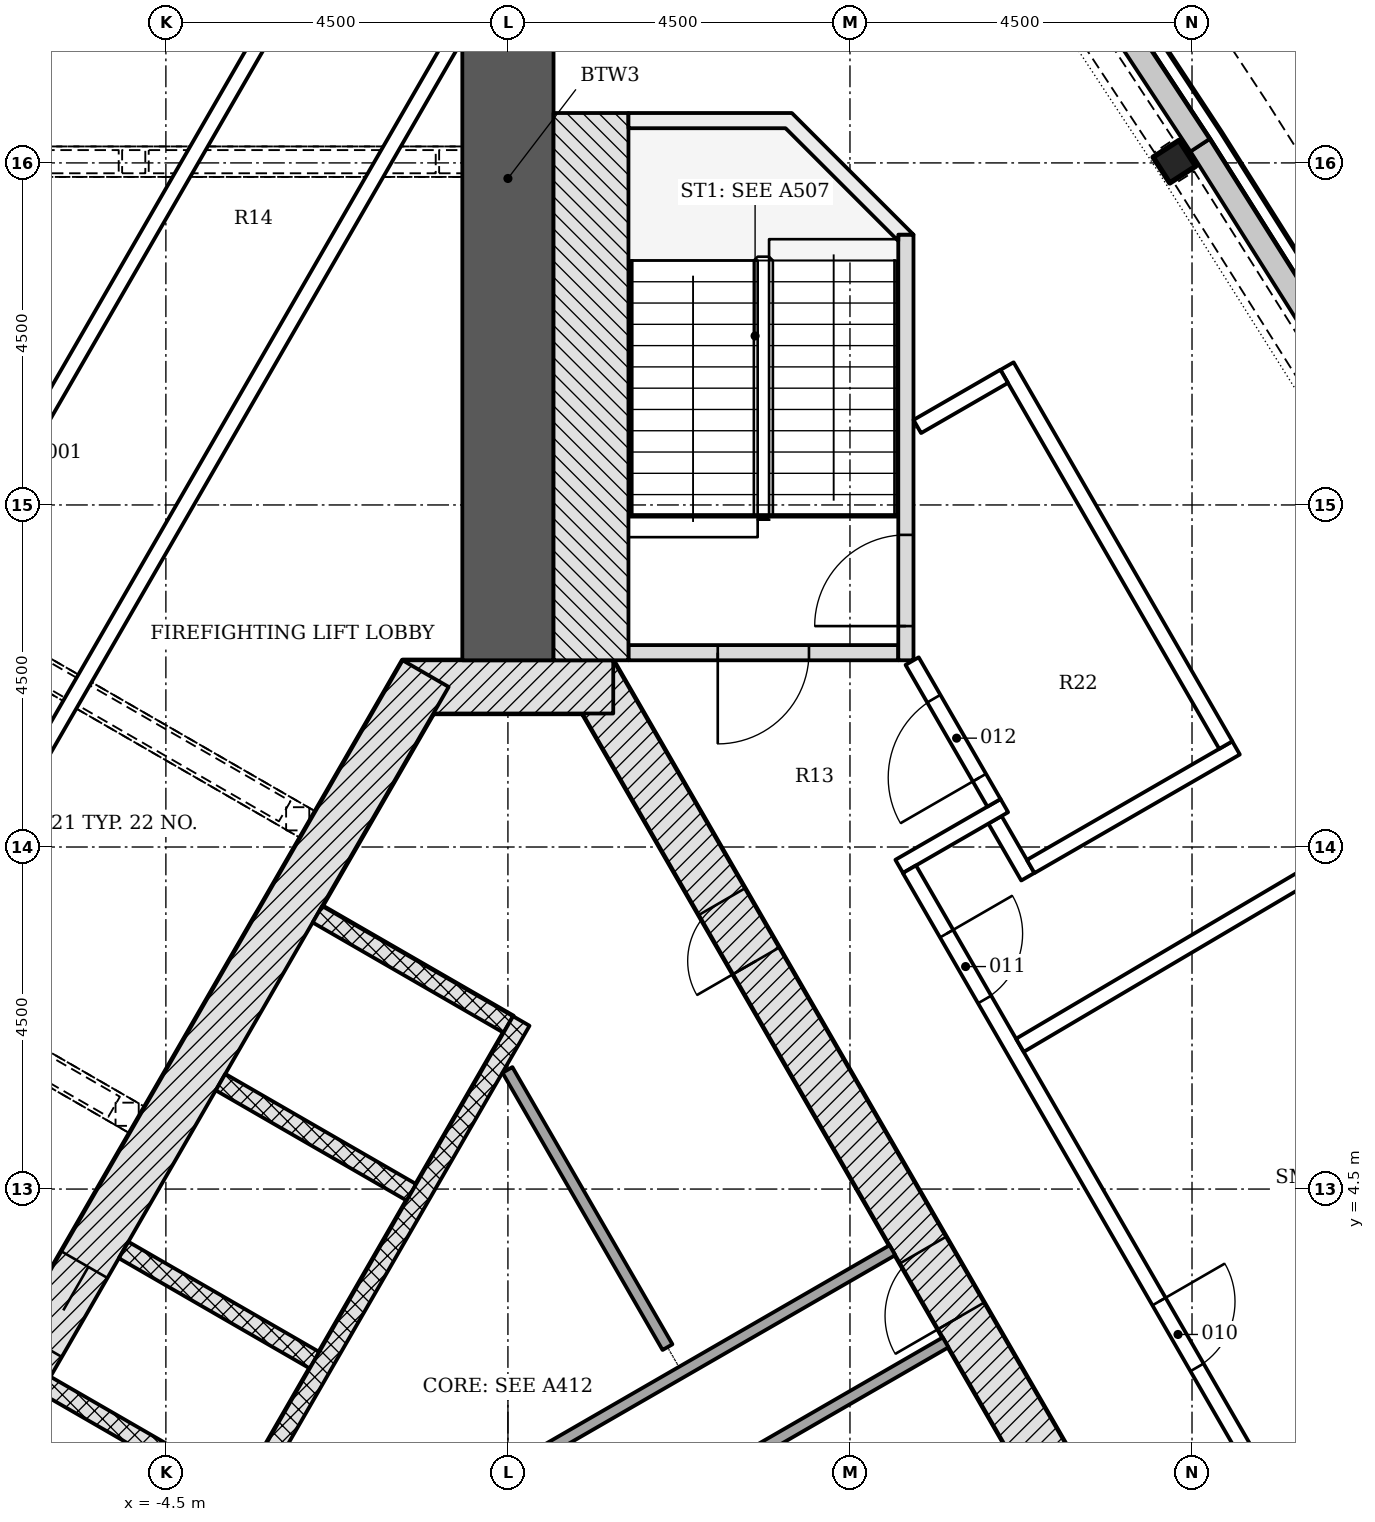
"""IFC4 building model, lengths in metres.
Left out: names, types, materials, properties, quantities, classifications, styles, units other than length and angle.
Written with IfcOpenShell. Run it as: python <this file> out.ifc"""

import sys

from ifc_helpers import new_model, si_unit, direction, frame, frame_2d, origin, origin_2d, place, context, subcontext, project, spatial, polyline, rectangle, i_section, outline, extrude, element, fill, save


model = new_model("IFC4")
c1 = context("Model", 3, precision=1e-05, world=origin(), true_north=direction((0.0, 1.0)))
c2 = subcontext(c1, "Body", "Model", "MODEL_VIEW")
j1 = project(units=[si_unit("LENGTHUNIT", "METRE"), si_unit("PLANEANGLEUNIT", "RADIAN")], contexts=[c1])
p1 = place(None, origin())
s1 = spatial("IfcSite", under=j1, at=p1, CompositionType="ELEMENT")
p2 = place(p1, origin())
s2 = spatial("IfcBuilding", under=s1, at=p2, CompositionType="ELEMENT")
p3 = place(p2, frame((0.0, 0.0, 87.0)))
s3 = spatial("IfcBuildingStorey", under=s2, at=p3, CompositionType="ELEMENT", Elevation=87.0)
p4 = place(p3, frame((10.311, -4.703, -0.3), z_axis=(0.0, 0.0, 1.0), x_axis=(-0.500001446645, 0.866024568562, 0.0)))
e1 = element("IfcWall", 1, at=p4, inside=s3, PredefinedType="SHEAR", context=c2, shape_type="SweptSolid", body=[
    extrude(rectangle(XDim=18.458, YDim=0.7, at=frame_2d((9.229, 0.0))), origin(), (0.0, 0.0, 1.0), 4.6),
])
p5 = place(p4, frame((8.7, 0.0, 0.3)))
e2 = element("IfcOpeningElement", 2, at=p5, cuts=e1, PredefinedType="OPENING", context=c2, shape_type="SweptSolid", body=[
    extrude(rectangle(XDim=1.0, YDim=2.1, at=frame_2d((0.5, 1.05))), frame((0.0, 0.36, 0.0), z_axis=(0.0, -1.0, 0.0), x_axis=(1.0, 0.0, 0.0)), (0.0, 0.0, 1.0), 0.72),
])
p6 = place(p4, frame((4.002, 0.0, 0.3)))
e3 = element("IfcOpeningElement", 3, at=p6, cuts=e1, PredefinedType="OPENING", context=c2, shape_type="SweptSolid", body=[
    extrude(rectangle(XDim=0.9, YDim=2.1, at=frame_2d((0.45, 1.05))), frame((0.0, 0.36, 0.0), z_axis=(0.0, -1.0, 0.0), x_axis=(1.0, 0.0, 0.0)), (0.0, 0.0, 1.0), 0.72),
])
p7 = place(p4, frame((14.093, 0.0, 0.3)))
e4 = element("IfcOpeningElement", 4, at=p7, cuts=e1, PredefinedType="OPENING", context=c2, shape_type="SweptSolid", body=[
    extrude(rectangle(XDim=0.9, YDim=2.1, at=frame_2d((0.45, 1.05))), frame((0.0, 0.36, 0.0), z_axis=(0.0, -1.0, 0.0), x_axis=(1.0, 0.0, 0.0)), (0.0, 0.0, 1.0), 0.72),
])
p8 = place(p3, frame((1.386, 11.106, -0.3), z_axis=(0.0, 0.0, 1.0), x_axis=(-1.0, 0.0, 0.0)))
e5 = element("IfcWall", 5, at=p8, inside=s3, PredefinedType="SHEAR", context=c2, shape_type="SweptSolid", body=[
    extrude(rectangle(XDim=2.771, YDim=0.7, at=frame_2d((1.386, 0.0))), origin(), (0.0, 0.0, 1.0), 4.6),
])
p9 = place(p3, frame((-1.083, 11.281, -0.3), z_axis=(0.0, 0.0, 1.0), x_axis=(-0.500001446645, -0.866024568562, 0.0)))
e6 = element("IfcWall", 6, at=p9, inside=s3, PredefinedType="SHEAR", context=c2, shape_type="SweptSolid", body=[
    extrude(rectangle(XDim=18.458, YDim=0.7, at=frame_2d((9.229, 0.0))), origin(), (0.0, 0.0, 1.0), 4.6),
])
p10 = place(p9, frame((8.979, 0.0, 0.3)))
e7 = element("IfcOpeningElement", 7, at=p10, cuts=e6, PredefinedType="OPENING", context=c2, shape_type="SweptSolid", body=[
    extrude(rectangle(XDim=1.2, YDim=2.1, at=frame_2d((0.6, 1.05))), frame((0.0, 0.36, 0.0), z_axis=(0.0, -1.0, 0.0), x_axis=(1.0, 0.0, 0.0)), (0.0, 0.0, 1.0), 0.72),
])
p11 = place(p9, frame((11.029, 0.0, 0.3)))
e8 = element("IfcOpeningElement", 8, at=p11, cuts=e6, PredefinedType="OPENING", context=c2, shape_type="SweptSolid", body=[
    extrude(rectangle(XDim=1.2, YDim=2.1, at=frame_2d((0.6, 1.05))), frame((0.0, 0.36, 0.0), z_axis=(0.0, -1.0, 0.0), x_axis=(1.0, 0.0, 0.0)), (0.0, 0.0, 1.0), 0.72),
])
p12 = place(p3, frame((0.0, 11.456, -0.3), z_axis=(0.0, 0.0, 1.0), x_axis=(0.0, 1.0, 0.0)))
e9 = element("IfcWall", 9, at=p12, inside=s3, PredefinedType="SHEAR", context=c2, shape_type="SweptSolid", body=[
    extrude(rectangle(XDim=12.678, YDim=1.2, at=frame_2d((6.339, 0.0))), origin(), (0.0, 0.0, 1.0), 4.6),
])
p13 = place(p3, frame((8.768, 18.016, -0.3), z_axis=(0.0, 0.0, 1.0), x_axis=(-0.541993100424, 0.840382935984, 0.0)))
e10 = element("IfcColumn", 10, at=p13, inside=s3, PredefinedType="COLUMN", context=c2, shape_type="SweptSolid", body=[
    extrude(i_section(OverallWidth=0.404, OverallDepth=0.406, WebThickness=0.027, FlangeThickness=0.044, FilletRadius=0.015, at=origin_2d()), origin(), (0.0, 0.0, 1.0), 4.6),
])
p14 = place(p3, origin())
e11 = element("IfcWall", 11, at=p14, inside=s3, PredefinedType="NOTDEFINED", context=c2, shape_type="SweptSolid", body=[
    extrude(outline(polyline([(11.632, 14.509), (9.23, 18.314), (8.977, 18.154), (11.378, 14.349), (11.632, 14.509)])), origin(), (0.0, 0.0, 1.0), 1.2),
])
p15 = place(p3, origin())
e12 = element("IfcWall", 12, at=p15, inside=s3, PredefinedType="NOTDEFINED", context=c2, shape_type="SweptSolid", body=[
    extrude(outline(polyline([(9.23, 18.314), (6.754, 22.072), (6.504, 21.907), (8.98, 18.149), (9.23, 18.314)])), origin(), (0.0, 0.0, 1.0), 1.2),
])
p16 = place(p3, frame((-2.506, 8.115, -0.3), z_axis=(0.0, 0.0, 1.0), x_axis=(0.865996321171, -0.50005036918, 0.0)))
e13 = element("IfcWall", 13, at=p16, inside=s3, PredefinedType="PARTITIONING", context=c2, shape_type="SweptSolid", body=[
    extrude(rectangle(XDim=2.9, YDim=0.25, at=frame_2d((1.45, 0.0))), origin(), (0.0, 0.0, 1.0), 4.6),
])
for number, where, z_axis, x_axis in (
    (14, (-3.781, 5.907, -0.3), (0.0, 0.0, 1.0), (0.866, -0.5, 0.0)),
    (15, (-5.056, 3.699, -0.3), (0.0, 0.0, 1.0), (0.866, -0.5, 0.0)),
    (16, (-6.081, 1.923, -0.3), (0.0, 0.0, 1.0), (0.866, -0.5, 0.0)),
):
    element("IfcWall", number, at=place(p3, frame(where, z_axis=z_axis, x_axis=x_axis)), inside=s3, PredefinedType="PARTITIONING", context=c2, shape_type="SweptSolid", body=[
        extrude(rectangle(XDim=2.9, YDim=0.25, at=frame_2d((1.45, 0.0))), origin(), (0.0, 0.0, 1.0), 4.6),
    ])
p17 = place(p3, frame((0.176, 6.711, 0.0), z_axis=(0.0, 0.0, 1.0), x_axis=(-0.500004227369, -0.866022963098, 0.0)))
e17 = element("IfcWall", 17, at=p17, inside=s3, PredefinedType="PARTITIONING", context=c2, shape_type="SweptSolid", body=[
    extrude(rectangle(XDim=11.8, YDim=0.25, at=frame_2d((5.9, 0.0))), origin(), (0.0, 0.0, 1.0), 4.3),
])
p18 = place(p3, frame((-4.548, -1.851, 0.0), z_axis=(0.0, 0.0, 1.0), x_axis=(0.866023939251, 0.500002536638, 0.0)))
e18 = element("IfcWall", 18, at=p18, inside=s3, PredefinedType="PARTITIONING", context=c2, shape_type="SweptSolid", body=[
    extrude(rectangle(XDim=11.092, YDim=0.15, at=frame_2d((5.546, 0.0))), origin(), (0.0, 0.0, 1.0), 4.3),
])
p19 = place(p18, frame((3.497, 0.0, 0.0)))
e19 = element("IfcOpeningElement", 19, at=p19, cuts=e18, PredefinedType="OPENING", context=c2, shape_type="SweptSolid", body=[
    extrude(rectangle(XDim=0.9, YDim=2.1, at=frame_2d((0.45, 1.05))), frame((0.0, 0.085, 0.0), z_axis=(0.0, -1.0, 0.0), x_axis=(1.0, 0.0, 0.0)), (0.0, 0.0, 1.0), 0.17),
])
p20 = place(p3, frame((2.099, 2.42, 0.0), z_axis=(0.0, 0.0, 1.0), x_axis=(-0.499998449073, 0.866026299211, 0.0)))
e20 = element("IfcWall", 20, at=p20, inside=s3, PredefinedType="PARTITIONING", context=c2, shape_type="SweptSolid", body=[
    extrude(rectangle(XDim=4.211, YDim=0.15, at=frame_2d((2.106, 0.0))), origin(), (0.0, 0.0, 1.0), 4.3),
])
p21 = place(p3, frame((-4.454, -3.413, 0.0), z_axis=(0.0, 0.0, 1.0), x_axis=(0.86603043987, 0.499991277142, 0.0)))
e21 = element("IfcWall", 21, at=p21, inside=s3, PredefinedType="PARTITIONING", context=c2, shape_type="SweptSolid", body=[
    extrude(rectangle(XDim=11.792, YDim=0.15, at=frame_2d((5.896, 0.0))), origin(), (0.0, 0.0, 1.0), 4.3),
])
p22 = place(p21, frame((3.847, 0.0, 0.0)))
e22 = element("IfcOpeningElement", 22, at=p22, cuts=e21, PredefinedType="OPENING", context=c2, shape_type="SweptSolid", body=[
    extrude(rectangle(XDim=0.9, YDim=2.1, at=frame_2d((0.45, 1.05))), frame((0.0, 0.085, 0.0), z_axis=(0.0, -1.0, 0.0), x_axis=(1.0, 0.0, 0.0)), (0.0, 0.0, 1.0), 0.17),
])
p23 = place(p3, frame((5.135, 11.556, -0.3), z_axis=(0.0, 0.0, 1.0), x_axis=(-1.0, 0.0, 0.0)))
e23 = element("IfcWall", 23, at=p23, inside=s3, PredefinedType="SHEAR", context=c2, shape_type="SweptSolid", body=[
    extrude(rectangle(XDim=3.55, YDim=0.2, at=frame_2d((1.775, 0.0))), origin(), (0.0, 0.0, 1.0), 4.6),
])
p24 = place(p23, frame((1.175, 0.0, 0.3)))
e24 = element("IfcOpeningElement", 24, at=p24, cuts=e23, PredefinedType="OPENING", context=c2, shape_type="SweptSolid", body=[
    extrude(rectangle(XDim=1.2, YDim=2.1, at=frame_2d((0.6, 1.05))), frame((0.0, 0.11, 0.0), z_axis=(0.0, -1.0, 0.0), x_axis=(1.0, 0.0, 0.0)), (0.0, 0.0, 1.0), 0.22),
])
p25 = place(p3, frame((5.236, 11.456, -0.3), z_axis=(0.0, 0.0, 1.0), x_axis=(0.0, 1.0, 0.0)))
e25 = element("IfcWall", 25, at=p25, inside=s3, PredefinedType="SHEAR", context=c2, shape_type="SweptSolid", body=[
    extrude(rectangle(XDim=5.6, YDim=0.2, at=frame_2d((2.8, 0.0))), origin(), (0.0, 0.0, 1.0), 4.6),
])
p26 = place(p25, frame((0.45, 0.0, 0.3)))
e26 = element("IfcOpeningElement", 26, at=p26, cuts=e25, PredefinedType="OPENING", context=c2, shape_type="SweptSolid", body=[
    extrude(rectangle(XDim=1.2, YDim=2.1, at=frame_2d((0.6, 1.05))), frame((0.0, 0.11, 0.0), z_axis=(0.0, -1.0, 0.0), x_axis=(1.0, 0.0, 0.0)), (0.0, 0.0, 1.0), 0.22),
])
p27 = place(p3, frame((1.093, 11.456, -0.3), z_axis=(0.0, 0.0, 1.0), x_axis=(0.0, 1.0, 0.0)))
e27 = element("IfcWall", 27, at=p27, inside=s3, PredefinedType="SHEAR", context=c2, shape_type="SweptSolid", body=[
    extrude(rectangle(XDim=7.2, YDim=0.986, at=frame_2d((3.6, 0.0))), origin(), (0.0, 0.0, 1.0), 4.6),
])
p28 = place(p3, frame((0.0, 0.0, -0.3)))
e28 = element("IfcWall", 28, at=p28, inside=s3, PredefinedType="SHEAR", context=c2, shape_type="SweptSolid", body=[
    extrude(outline(polyline([(5.336, 17.056), (3.736, 18.656), (1.586, 18.656), (1.586, 18.456), (3.653, 18.456), (5.135, 16.974), (5.135, 17.056), (5.135, 17.056), (5.135, 17.056), (5.135, 17.056), (5.135, 17.056), (5.135, 17.056), (5.135, 17.056), (5.135, 17.056), (5.135, 17.056), (5.135, 17.056), (5.135, 17.056), (5.135, 17.056), (5.135, 17.056), (5.135, 17.056), (5.135, 17.056), (5.135, 17.056), (5.135, 17.056), (5.336, 17.056)])), origin(), (0.0, 0.0, 1.0), 4.6),
])
p29 = place(p3, frame((-0.687, 19.667, 0.0), z_axis=(0.0, 0.0, 1.0), x_axis=(-0.500000491645, -0.866025119933, 0.0)))
e29 = element("IfcWall", 29, at=p29, inside=s3, PredefinedType="PARTITIONING", context=c2, shape_type="SweptSolid", body=[
    extrude(rectangle(XDim=23.943, YDim=0.2, at=frame_2d((11.971, 0.0))), origin(), (0.0, 0.0, 1.0), 3.678),
])
p30 = place(p29, frame((16.287, 0.0, 0.0)))
e30 = element("IfcOpeningElement", 30, at=p30, cuts=e29, PredefinedType="OPENING", context=c2, shape_type="SweptSolid", body=[
    extrude(rectangle(XDim=1.2, YDim=2.1, at=frame_2d((0.6, 1.05))), frame((0.0, 0.11, 0.0), z_axis=(0.0, -1.0, 0.0), x_axis=(1.0, 0.0, 0.0)), (0.0, 0.0, 1.0), 0.22),
])
p31 = place(p3, frame((-16.45, -3.237, 0.0), z_axis=(0.0, 0.0, 1.0), x_axis=(0.499997734893, 0.866026711541, 0.0)))
e31 = element("IfcWall", 31, at=p31, inside=s3, PredefinedType="PARTITIONING", context=c2, shape_type="SweptSolid", body=[
    extrude(rectangle(XDim=31.527, YDim=0.2, at=frame_2d((15.764, 0.0))), origin(), (0.0, 0.0, 1.0), 3.678),
])
p32 = place(p31, frame((19.615, 0.0, 0.0)))
e32 = element("IfcOpeningElement", 32, at=p32, cuts=e31, PredefinedType="OPENING", context=c2, shape_type="SweptSolid", body=[
    extrude(rectangle(XDim=1.0, YDim=2.1, at=frame_2d((0.5, 1.05))), frame((0.0, 0.11, 0.0), z_axis=(0.0, -1.0, 0.0), x_axis=(1.0, 0.0, 0.0)), (0.0, 0.0, 1.0), 0.22),
])
p33 = place(p31, frame((1.828, 0.0, 0.0)))
e33 = element("IfcOpeningElement", 33, at=p33, cuts=e31, PredefinedType="OPENING", context=c2, shape_type="SweptSolid", body=[
    extrude(rectangle(XDim=1.0, YDim=2.1, at=frame_2d((0.5, 1.05))), frame((0.0, 0.11, 0.0), z_axis=(0.0, -1.0, 0.0), x_axis=(1.0, 0.0, 0.0)), (0.0, 0.0, 1.0), 0.22),
])
p34 = place(p3, frame((6.408, 9.358, 0.0), z_axis=(0.0, 0.0, 1.0), x_axis=(0.49996696679, -0.866044474677, 0.0)))
e34 = element("IfcWall", 34, at=p34, inside=s3, PredefinedType="PARTITIONING", context=c2, shape_type="SweptSolid", body=[
    extrude(rectangle(XDim=0.864, YDim=0.2, at=frame_2d((0.432, 0.0))), origin(), (0.0, 0.0, 1.0), 4.3),
])
p35 = place(p3, frame((5.147, 8.745, 0.0), z_axis=(0.0, 0.0, 1.0), x_axis=(0.865987117328, 0.500066308224, 0.0)))
e35 = element("IfcWall", 35, at=p35, inside=s3, PredefinedType="PARTITIONING", context=c2, shape_type="SweptSolid", body=[
    extrude(rectangle(XDim=1.598, YDim=0.2, at=frame_2d((0.799, 0.0))), origin(), (0.0, 0.0, 1.0), 4.3),
])
p36 = place(p3, frame((6.395, 9.581, 0.0), z_axis=(0.0, 0.0, 1.0), x_axis=(-0.500003735859, 0.866023246874, 0.0)))
e36 = element("IfcWall", 36, at=p36, inside=s3, PredefinedType="PARTITIONING", context=c2, shape_type="SweptSolid", body=[
    extrude(rectangle(XDim=2.154, YDim=0.2, at=frame_2d((1.077, 0.0))), origin(), (0.0, 0.0, 1.0), 3.678),
])
p37 = place(p36, frame((0.383, 0.0, 0.0)))
e37 = element("IfcOpeningElement", 37, at=p37, cuts=e36, PredefinedType="OPENING", context=c2, shape_type="SweptSolid", body=[
    extrude(rectangle(XDim=1.2, YDim=2.1, at=frame_2d((0.6, 1.05))), frame((0.0, 0.11, 0.0), z_axis=(0.0, -1.0, 0.0), x_axis=(1.0, 0.0, 0.0)), (0.0, 0.0, 1.0), 0.22),
])
p38 = place(p3, frame((5.282, 8.708, 0.0), z_axis=(0.0, 0.0, 1.0), x_axis=(0.500007704848, -0.866020955343, 0.0)))
e38 = element("IfcWall", 38, at=p38, inside=s3, PredefinedType="PARTITIONING", context=c2, shape_type="SweptSolid", body=[
    extrude(rectangle(XDim=18.991, YDim=0.2, at=frame_2d((9.496, 0.0))), origin(), (0.0, 0.0, 1.0), 3.678),
])
p39 = place(p38, frame((14.783, 0.0, 0.0)))
e39 = element("IfcOpeningElement", 39, at=p39, cuts=e38, PredefinedType="OPENING", context=c2, shape_type="SweptSolid", body=[
    extrude(rectangle(XDim=1.0, YDim=2.1, at=frame_2d((0.5, 1.05))), frame((0.0, 0.11, 0.0), z_axis=(0.0, -1.0, 0.0), x_axis=(1.0, 0.0, 0.0)), (0.0, 0.0, 1.0), 0.22),
])
p40 = place(p38, frame((6.567, 0.0, 0.0)))
e40 = element("IfcOpeningElement", 40, at=p40, cuts=e38, PredefinedType="OPENING", context=c2, shape_type="SweptSolid", body=[
    extrude(rectangle(XDim=1.0, YDim=2.1, at=frame_2d((0.5, 1.05))), frame((0.0, 0.11, 0.0), z_axis=(0.0, -1.0, 0.0), x_axis=(1.0, 0.0, 0.0)), (0.0, 0.0, 1.0), 0.22),
])
p41 = place(p38, frame((0.979, 0.0, 0.0)))
e41 = element("IfcOpeningElement", 41, at=p41, cuts=e38, PredefinedType="OPENING", context=c2, shape_type="SweptSolid", body=[
    extrude(rectangle(XDim=1.0, YDim=2.1, at=frame_2d((0.5, 1.05))), frame((0.0, 0.11, 0.0), z_axis=(0.0, -1.0, 0.0), x_axis=(1.0, 0.0, 0.0)), (0.0, 0.0, 1.0), 0.22),
])
p42 = place(p3, frame((6.736, 6.392, 0.0), z_axis=(0.0, 0.0, 1.0), x_axis=(0.861056110095, 0.508509955919, 0.0)))
e42 = element("IfcWall", 42, at=p42, inside=s3, PredefinedType="PARTITIONING", context=c2, shape_type="SweptSolid", body=[
    extrude(rectangle(XDim=7.688, YDim=0.2, at=frame_2d((3.844, 0.0))), origin(), (0.0, 0.0, 1.0), 3.678),
])
p43 = place(p3, frame((6.878, 8.744, 0.0), z_axis=(0.0, 0.0, 1.0), x_axis=(0.866023983177, 0.500002460556, 0.0)))
e43 = element("IfcWall", 43, at=p43, inside=s3, PredefinedType="PARTITIONING", context=c2, shape_type="SweptSolid", body=[
    extrude(rectangle(XDim=3.12, YDim=0.2, at=frame_2d((1.56, 0.0))), origin(), (0.0, 0.0, 1.0), 4.3),
])
p44 = place(p3, frame((6.566, 15.327, 0.0), z_axis=(0.0, 0.0, 1.0), x_axis=(0.499997778408, -0.866026686418, 0.0)))
e44 = element("IfcWall", 44, at=p44, inside=s3, PredefinedType="PARTITIONING", context=c2, shape_type="SweptSolid", body=[
    extrude(rectangle(XDim=5.757, YDim=0.2, at=frame_2d((2.878, 0.0))), origin(), (0.0, 0.0, 1.0), 3.678),
])
p45 = place(p3, frame((6.529, 15.192, 0.0), z_axis=(0.0, 0.0, 1.0), x_axis=(-0.866117824122, -0.499839889103, 0.0)))
e45 = element("IfcWall", 45, at=p45, inside=s3, PredefinedType="PARTITIONING", context=c2, shape_type="SweptSolid", body=[
    extrude(rectangle(XDim=1.32, YDim=0.2, at=frame_2d((0.66, 0.0))), origin(), (0.0, 0.0, 1.0), 4.3),
])
p46 = place(p10, origin())
e46 = element("IfcDoor", 46, at=p46, inside=s3, OperationType="DOUBLE_DOOR_SLIDING", PredefinedType="DOOR", context=c2, shape_type="SweptSolid", body=[
    extrude(rectangle(XDim=1.2, YDim=2.1, at=frame_2d((0.6, 1.05))), frame((0.0, 0.025, 0.0), z_axis=(0.0, -1.0, 0.0), x_axis=(1.0, 0.0, 0.0)), (0.0, 0.0, 1.0), 0.05),
])
fill(e7, e46)
p47 = place(p5, origin())
e47 = element("IfcDoor", 47, at=p47, inside=s3, OperationType="SINGLE_SWING_LEFT", PredefinedType="DOOR", context=c2, shape_type="SweptSolid", body=[
    extrude(rectangle(XDim=1.0, YDim=2.1, at=frame_2d((0.5, 1.05))), frame((0.0, 0.075, 0.0), z_axis=(0.0, -1.0, 0.0), x_axis=(1.0, 0.0, 0.0)), (0.0, 0.0, 1.0), 0.15),
])
fill(e2, e47)
p48 = place(p7, origin())
e48 = element("IfcDoor", 48, at=p48, inside=s3, OperationType="SINGLE_SWING_LEFT", PredefinedType="DOOR", context=c2, shape_type="SweptSolid", body=[
    extrude(rectangle(XDim=0.9, YDim=2.1, at=frame_2d((0.45, 1.05))), frame((0.0, 0.075, 0.0), z_axis=(0.0, -1.0, 0.0), x_axis=(1.0, 0.0, 0.0)), (0.0, 0.0, 1.0), 0.15),
])
fill(e4, e48)
p49 = place(p24, origin())
e49 = element("IfcDoor", 49, at=p49, inside=s3, OperationType="SINGLE_SWING_RIGHT", PredefinedType="DOOR", context=c2, shape_type="SweptSolid", body=[
    extrude(rectangle(XDim=1.2, YDim=2.1, at=frame_2d((0.6, 1.05))), frame((0.0, 0.025, 0.0), z_axis=(0.0, -1.0, 0.0), x_axis=(1.0, 0.0, 0.0)), (0.0, 0.0, 1.0), 0.05),
])
fill(e24, e49)
p50 = place(p26, origin())
e50 = element("IfcDoor", 50, at=p50, inside=s3, OperationType="SINGLE_SWING_LEFT", PredefinedType="DOOR", context=c2, shape_type="SweptSolid", body=[
    extrude(rectangle(XDim=1.2, YDim=2.1, at=frame_2d((0.6, 1.05))), frame((0.0, 0.025, 0.0), z_axis=(0.0, -1.0, 0.0), x_axis=(1.0, 0.0, 0.0)), (0.0, 0.0, 1.0), 0.05),
])
fill(e26, e50)
p51 = place(p40, origin())
e51 = element("IfcDoor", 51, at=p51, inside=s3, OperationType="SINGLE_SWING_LEFT", PredefinedType="DOOR", context=c2, shape_type="SweptSolid", body=[
    extrude(rectangle(XDim=1.0, YDim=2.1, at=frame_2d((0.5, 1.05))), frame((0.0, 0.025, 0.0), z_axis=(0.0, -1.0, 0.0), x_axis=(1.0, 0.0, 0.0)), (0.0, 0.0, 1.0), 0.05),
])
fill(e40, e51)
p52 = place(p41, origin())
e52 = element("IfcDoor", 52, at=p52, inside=s3, OperationType="SINGLE_SWING_LEFT", PredefinedType="DOOR", context=c2, shape_type="SweptSolid", body=[
    extrude(rectangle(XDim=1.0, YDim=2.1, at=frame_2d((0.5, 1.05))), frame((0.0, 0.025, 0.0), z_axis=(0.0, -1.0, 0.0), x_axis=(1.0, 0.0, 0.0)), (0.0, 0.0, 1.0), 0.05),
])
fill(e41, e52)
p53 = place(p37, origin())
e53 = element("IfcDoor", 53, at=p53, inside=s3, OperationType="SINGLE_SWING_LEFT", PredefinedType="DOOR", context=c2, shape_type="SweptSolid", body=[
    extrude(rectangle(XDim=1.2, YDim=2.1, at=frame_2d((0.6, 1.05))), frame((0.0, 0.025, 0.0), z_axis=(0.0, -1.0, 0.0), x_axis=(1.0, 0.0, 0.0)), (0.0, 0.0, 1.0), 0.05),
])
fill(e37, e53)
save(model, sys.argv[1])
